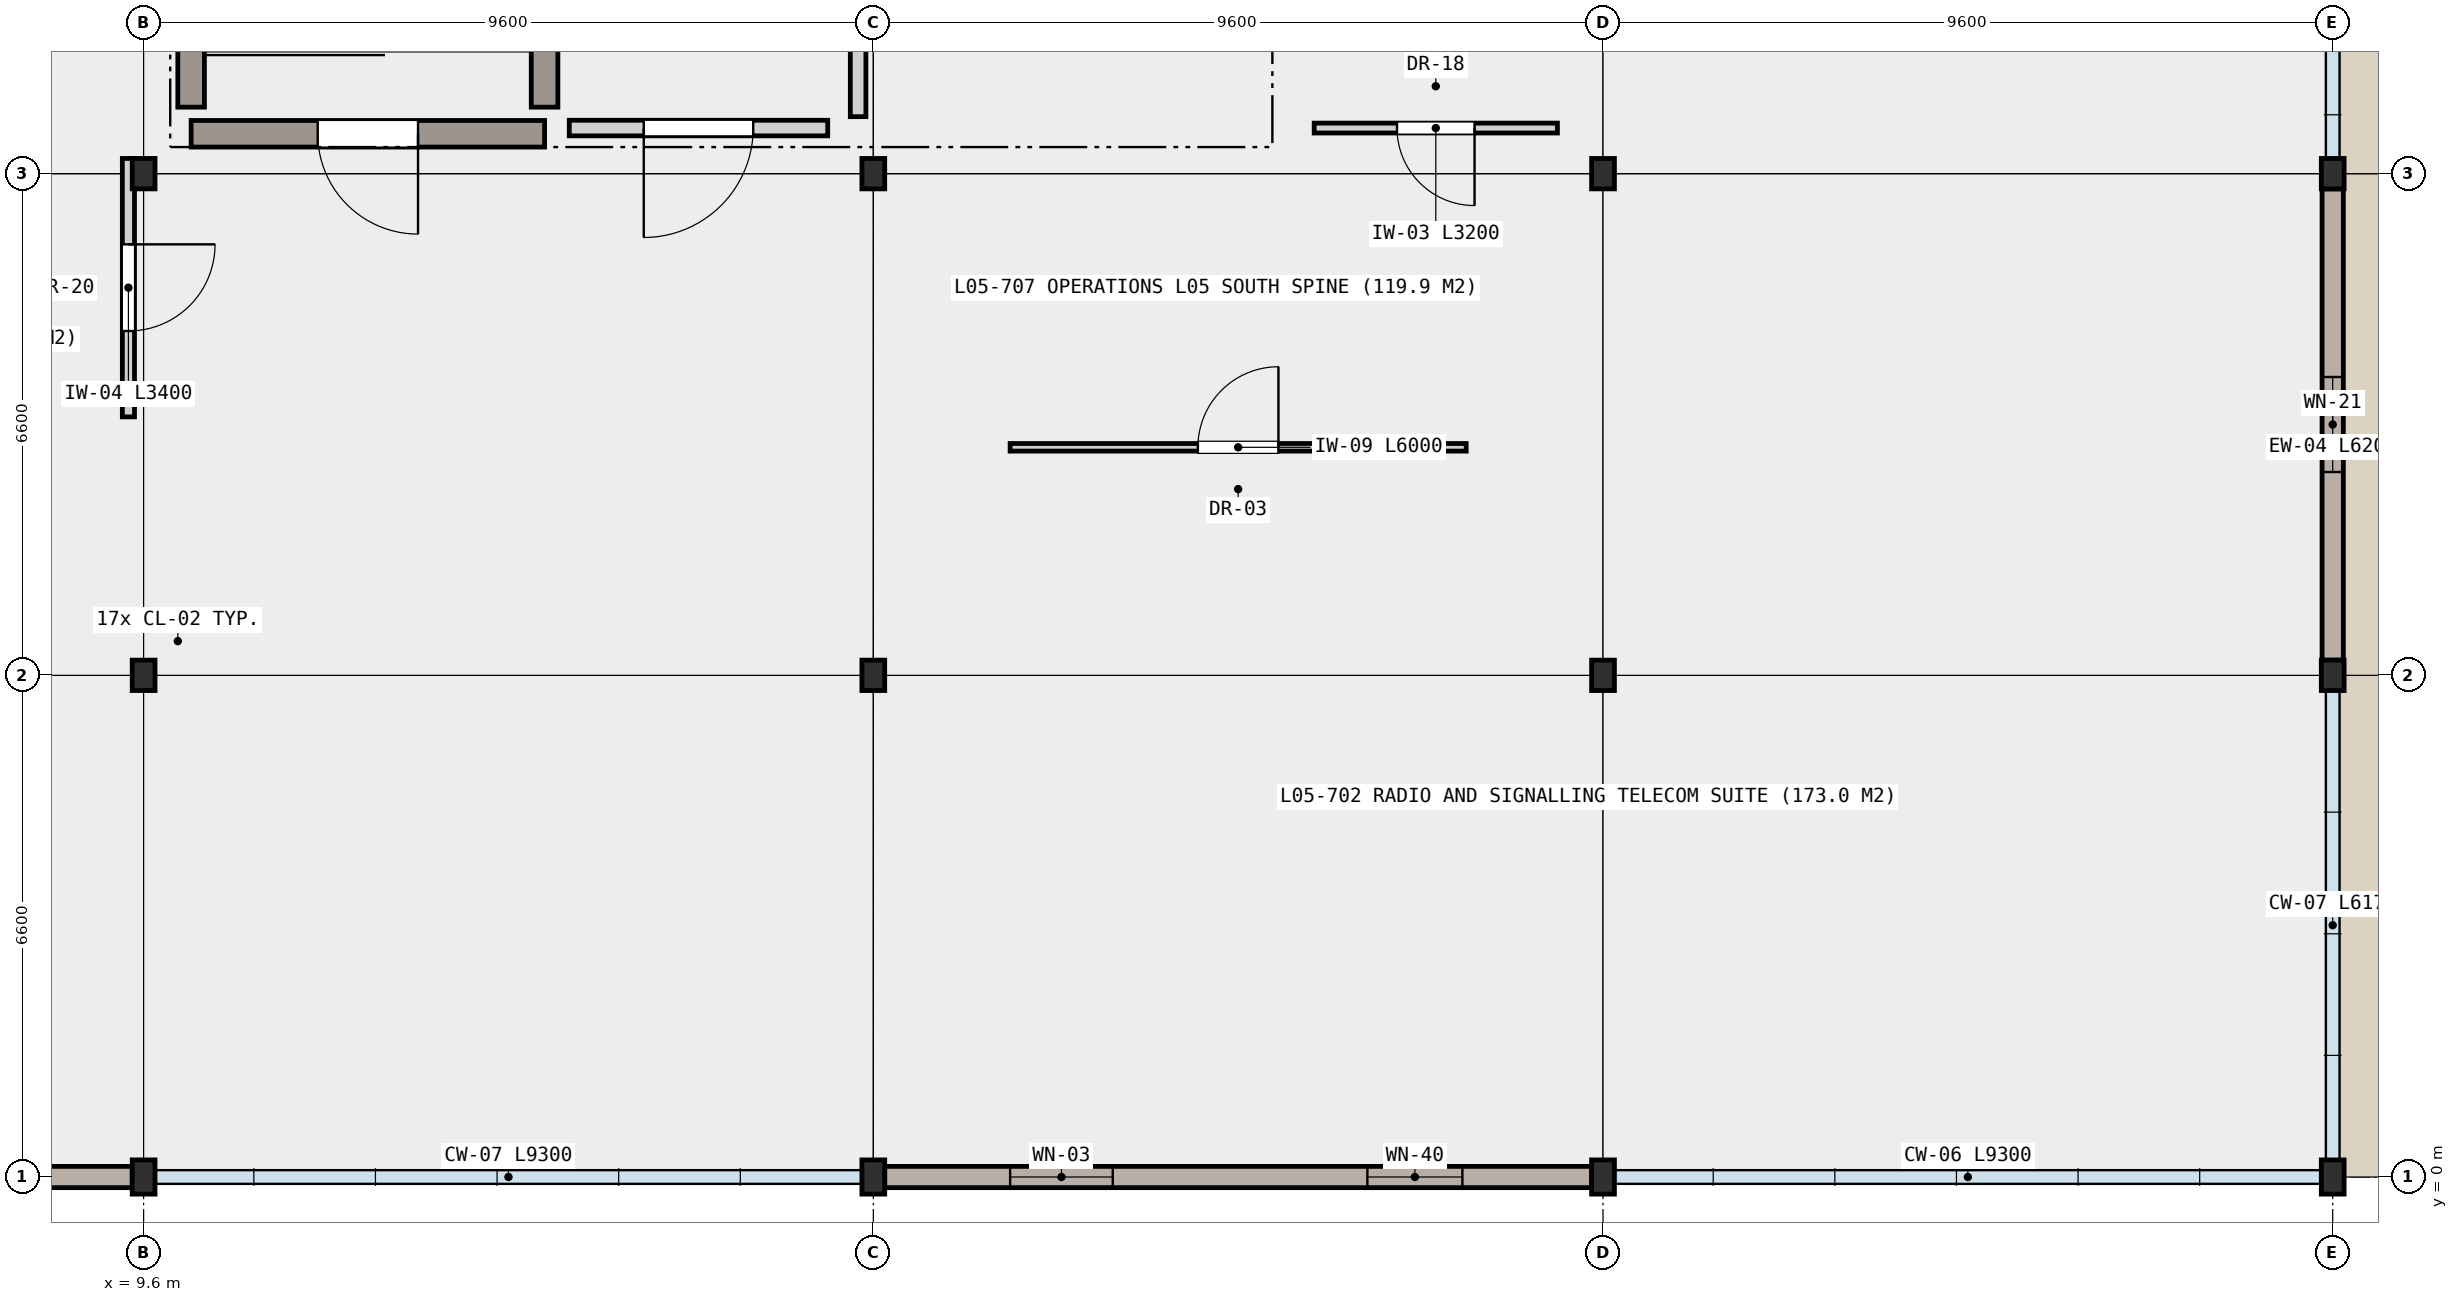
"""IFC4 building model, lengths in metres.
Left out: names, types, materials, properties, quantities, classifications, styles, units other than length and angle.
Written with IfcOpenShell. Run it as: python <this file> out.ifc"""

import sys

from ifc_helpers import new_model, si_unit, direction, frame, frame_2d, origin, origin_2d, place, context, subcontext, project, spatial, rectangle, i_section, extrude, element, fill, save


model = new_model("IFC4")
c1 = context("Model", 3, precision=1e-05, world=origin(), true_north=direction((0.0, 1.0)))
c2 = subcontext(c1, "Body", "Model", "MODEL_VIEW")
j1 = project(units=[si_unit("LENGTHUNIT", "METRE"), si_unit("PLANEANGLEUNIT", "RADIAN")], contexts=[c1])
p1 = place(None, origin())
s1 = spatial("IfcSite", under=j1, at=p1, CompositionType="ELEMENT")
p2 = place(p1, origin())
s2 = spatial("IfcBuilding", under=s1, at=p2, CompositionType="ELEMENT")
p3 = place(p2, frame((0.0, 0.0, 22.8)))
s3 = spatial("IfcBuildingStorey", under=s2, at=p3, CompositionType="ELEMENT", Elevation=22.8)
p4 = place(p3, frame((9.6, 0.0, 0.0), z_axis=(0.0, 0.0, 1.0), x_axis=(1.0, 0.0, 0.0)))
e1 = element("IfcColumn", 1, at=p4, inside=s3, PredefinedType="COLUMN", context=c2, shape_type="SweptSolid", body=[
    extrude(i_section(OverallWidth=0.3, OverallDepth=0.45, WebThickness=0.014, FlangeThickness=0.026, FilletRadius=0.027, at=origin_2d()), origin(), (0.0, 0.0, 1.0), 4.2),
])
for number, where, z_axis, x_axis in (
    (2, (9.6, 6.6, 0.0), (0.0, 0.0, 1.0), (1.0, 0.0, 0.0)),
    (3, (9.6, 13.2, 0.0), (0.0, 0.0, 1.0), (1.0, 0.0, 0.0)),
):
    element("IfcColumn", number, at=place(p3, frame(where, z_axis=z_axis, x_axis=x_axis)), inside=s3, PredefinedType="COLUMN", context=c2, shape_type="SweptSolid", body=[
        extrude(i_section(OverallWidth=0.3, OverallDepth=0.4, WebThickness=0.013, FlangeThickness=0.024, FilletRadius=0.027, at=origin_2d()), origin(), (0.0, 0.0, 1.0), 4.2),
    ])
p5 = place(p3, frame((19.2, 0.0, 0.0), z_axis=(0.0, 0.0, 1.0), x_axis=(1.0, 0.0, 0.0)))
e4 = element("IfcColumn", 4, at=p5, inside=s3, PredefinedType="COLUMN", context=c2, shape_type="SweptSolid", body=[
    extrude(i_section(OverallWidth=0.3, OverallDepth=0.45, WebThickness=0.014, FlangeThickness=0.026, FilletRadius=0.027, at=origin_2d()), origin(), (0.0, 0.0, 1.0), 4.2),
])
for number, where, z_axis, x_axis in (
    (5, (19.2, 6.6, 0.0), (0.0, 0.0, 1.0), (1.0, 0.0, 0.0)),
    (6, (19.2, 13.2, 0.0), (0.0, 0.0, 1.0), (1.0, 0.0, 0.0)),
):
    element("IfcColumn", number, at=place(p3, frame(where, z_axis=z_axis, x_axis=x_axis)), inside=s3, PredefinedType="COLUMN", context=c2, shape_type="SweptSolid", body=[
        extrude(i_section(OverallWidth=0.3, OverallDepth=0.4, WebThickness=0.013, FlangeThickness=0.024, FilletRadius=0.027, at=origin_2d()), origin(), (0.0, 0.0, 1.0), 4.2),
    ])
p6 = place(p3, frame((28.8, 0.0, 0.0), z_axis=(0.0, 0.0, 1.0), x_axis=(1.0, 0.0, 0.0)))
e7 = element("IfcColumn", 7, at=p6, inside=s3, PredefinedType="COLUMN", context=c2, shape_type="SweptSolid", body=[
    extrude(i_section(OverallWidth=0.3, OverallDepth=0.45, WebThickness=0.014, FlangeThickness=0.026, FilletRadius=0.027, at=origin_2d()), origin(), (0.0, 0.0, 1.0), 4.2),
])
for number, where, z_axis, x_axis in (
    (8, (28.8, 6.6, 0.0), (0.0, 0.0, 1.0), (1.0, 0.0, 0.0)),
    (9, (28.8, 13.2, 0.0), (0.0, 0.0, 1.0), (1.0, 0.0, 0.0)),
):
    element("IfcColumn", number, at=place(p3, frame(where, z_axis=z_axis, x_axis=x_axis)), inside=s3, PredefinedType="COLUMN", context=c2, shape_type="SweptSolid", body=[
        extrude(i_section(OverallWidth=0.3, OverallDepth=0.4, WebThickness=0.013, FlangeThickness=0.024, FilletRadius=0.027, at=origin_2d()), origin(), (0.0, 0.0, 1.0), 4.2),
    ])
p7 = place(p3, frame((38.4, 0.0, 0.0), z_axis=(0.0, 0.0, 1.0), x_axis=(1.0, 0.0, 0.0)))
e10 = element("IfcColumn", 10, at=p7, inside=s3, PredefinedType="COLUMN", context=c2, shape_type="SweptSolid", body=[
    extrude(i_section(OverallWidth=0.3, OverallDepth=0.45, WebThickness=0.014, FlangeThickness=0.026, FilletRadius=0.027, at=origin_2d()), origin(), (0.0, 0.0, 1.0), 4.2),
])
for number, where, z_axis, x_axis in (
    (11, (38.4, 6.6, 0.0), (0.0, 0.0, 1.0), (1.0, 0.0, 0.0)),
    (12, (38.4, 13.2, 0.0), (0.0, 0.0, 1.0), (1.0, 0.0, 0.0)),
):
    element("IfcColumn", number, at=place(p3, frame(where, z_axis=z_axis, x_axis=x_axis)), inside=s3, PredefinedType="COLUMN", context=c2, shape_type="SweptSolid", body=[
        extrude(i_section(OverallWidth=0.3, OverallDepth=0.4, WebThickness=0.013, FlangeThickness=0.024, FilletRadius=0.027, at=origin_2d()), origin(), (0.0, 0.0, 1.0), 4.2),
    ])
p8 = place(p3, frame((38.4, 13.0, 0.0), z_axis=(0.0, 0.0, 1.0), x_axis=(0.0, -1.0, 0.0)))
e13 = element("IfcWall", 13, at=p8, inside=s3, PredefinedType="SOLIDWALL", context=c2, shape_type="SweptSolid", body=[
    extrude(rectangle(XDim=6.2, YDim=0.28, at=frame_2d((3.1, 0.0))), origin(), (0.0, 0.0, 1.0), 3.57),
])
p9 = place(p8, frame((2.475, 0.0, 0.85)))
e14 = element("IfcOpeningElement", 14, at=p9, cuts=e13, PredefinedType="OPENING", context=c2, shape_type="SweptSolid", body=[
    extrude(rectangle(XDim=1.25, YDim=1.85, at=frame_2d((0.625, 0.925))), frame((0.0, 0.15, 0.0), z_axis=(0.0, -1.0, 0.0), x_axis=(1.0, 0.0, 0.0)), (0.0, 0.0, 1.0), 0.3),
])
p10 = place(p3, frame((28.65, 0.0, 0.0), z_axis=(0.0, 0.0, 1.0), x_axis=(-1.0, 0.0, 0.0)))
e15 = element("IfcWall", 15, at=p10, inside=s3, PredefinedType="SOLIDWALL", context=c2, shape_type="SweptSolid", body=[
    extrude(rectangle(XDim=9.3, YDim=0.28, at=frame_2d((4.65, 0.0))), origin(), (0.0, 0.0, 1.0), 3.61),
])
p11 = place(p10, frame((1.7, 0.0, 0.85)))
e16 = element("IfcOpeningElement", 16, at=p11, cuts=e15, PredefinedType="OPENING", context=c2, shape_type="SweptSolid", body=[
    extrude(rectangle(XDim=1.25, YDim=2.15, at=frame_2d((0.625, 1.075))), frame((0.0, 0.15, 0.0), z_axis=(0.0, -1.0, 0.0), x_axis=(1.0, 0.0, 0.0)), (0.0, 0.0, 1.0), 0.3),
])
p12 = place(p10, frame((6.3, 0.0, 0.85)))
e17 = element("IfcOpeningElement", 17, at=p12, cuts=e15, PredefinedType="OPENING", context=c2, shape_type="SweptSolid", body=[
    extrude(rectangle(XDim=1.35, YDim=1.5, at=frame_2d((0.675, 0.75))), frame((0.0, 0.15, 0.0), z_axis=(0.0, -1.0, 0.0), x_axis=(1.0, 0.0, 0.0)), (0.0, 0.0, 1.0), 0.3),
])
p13 = place(p3, frame((9.45, 0.0, 0.0), z_axis=(0.0, 0.0, 1.0), x_axis=(-1.0, 0.0, 0.0)))
e18 = element("IfcWall", 18, at=p13, inside=s3, PredefinedType="SOLIDWALL", context=c2, shape_type="SweptSolid", body=[
    extrude(rectangle(XDim=9.3, YDim=0.28, at=frame_2d((4.65, 0.0))), origin(), (0.0, 0.0, 1.0), 3.61),
])
p14 = place(p13, frame((1.65, 0.0, 0.85)))
e19 = element("IfcOpeningElement", 19, at=p14, cuts=e18, PredefinedType="OPENING", context=c2, shape_type="SweptSolid", body=[
    extrude(rectangle(XDim=1.35, YDim=1.85, at=frame_2d((0.675, 0.925))), frame((0.0, 0.15, 0.0), z_axis=(0.0, -1.0, 0.0), x_axis=(1.0, 0.0, 0.0)), (0.0, 0.0, 1.0), 0.3),
])
p15 = place(p13, frame((6.3, 0.0, 0.85)))
e20 = element("IfcOpeningElement", 20, at=p15, cuts=e18, PredefinedType="OPENING", context=c2, shape_type="SweptSolid", body=[
    extrude(rectangle(XDim=1.35, YDim=2.15, at=frame_2d((0.675, 1.075))), frame((0.0, 0.15, 0.0), z_axis=(0.0, -1.0, 0.0), x_axis=(1.0, 0.0, 0.0)), (0.0, 0.0, 1.0), 0.3),
])
p16 = place(p3, frame((14.875, 13.725, 0.0), z_axis=(0.0, 0.0, 1.0), x_axis=(-1.0, 0.0, 0.0)))
e21 = element("IfcWall", 21, at=p16, inside=s3, PredefinedType="SHEAR", context=c2, shape_type="SweptSolid", body=[
    extrude(rectangle(XDim=4.65, YDim=0.35, at=frame_2d((2.325, 0.0))), origin(), (0.0, 0.0, 1.0), 3.99),
])
p17 = place(p16, frame((1.665, 0.0, 0.0)))
e22 = element("IfcOpeningElement", 22, at=p17, cuts=e21, PredefinedType="OPENING", context=c2, shape_type="SweptSolid", body=[
    extrude(rectangle(XDim=1.32, YDim=2.15, at=frame_2d((0.66, 1.075))), frame((0.0, 0.185, 0.0), z_axis=(0.0, -1.0, 0.0), x_axis=(1.0, 0.0, 0.0)), (0.0, 0.0, 1.0), 0.37),
])
for number, where, z_axis, x_axis in (
    (23, (10.225, 14.075, 0.0), (0.0, 0.0, 1.0), (0.0, 1.0, 0.0)),
    (24, (14.875, 21.125, 0.0), (0.0, 0.0, 1.0), (0.0, -1.0, 0.0)),
):
    element("IfcWall", number, at=place(p3, frame(where, z_axis=z_axis, x_axis=x_axis)), inside=s3, PredefinedType="SHEAR", context=c2, shape_type="SweptSolid", body=[
        extrude(rectangle(XDim=7.05, YDim=0.35, at=frame_2d((3.525, 0.0))), origin(), (0.0, 0.0, 1.0), 3.99),
    ])
p18 = place(p3, frame((18.6, 13.8, 0.0), z_axis=(0.0, 0.0, 1.0), x_axis=(-1.0, 0.0, 0.0)))
e25 = element("IfcWall", 25, at=p18, inside=s3, PredefinedType="PARTITIONING", context=c2, shape_type="SweptSolid", body=[
    extrude(rectangle(XDim=3.4, YDim=0.205, at=frame_2d((1.7, 0.0))), origin(), (0.0, 0.0, 1.0), 3.99),
])
p19 = place(p18, frame((0.98, 0.0, 0.0)))
e26 = element("IfcOpeningElement", 26, at=p19, cuts=e25, PredefinedType="OPENING", context=c2, shape_type="SweptSolid", body=[
    extrude(rectangle(XDim=1.44, YDim=2.18, at=frame_2d((0.72, 1.09))), frame((0.0, 0.113, 0.0), z_axis=(0.0, -1.0, 0.0), x_axis=(1.0, 0.0, 0.0)), (0.0, 0.0, 1.0), 0.225),
])
p20 = place(p3, frame((19.0, 18.45, 0.0), z_axis=(0.0, 0.0, 1.0), x_axis=(0.0, -1.0, 0.0)))
e27 = element("IfcWall", 27, at=p20, inside=s3, PredefinedType="PARTITIONING", context=c2, shape_type="SweptSolid", body=[
    extrude(rectangle(XDim=4.5, YDim=0.205, at=frame_2d((2.25, 0.0))), origin(), (0.0, 0.0, 1.0), 3.57),
])
p21 = place(p3, frame((28.2, 13.8, 0.0), z_axis=(0.0, 0.0, 1.0), x_axis=(-1.0, 0.0, 0.0)))
e28 = element("IfcWall", 28, at=p21, inside=s3, PredefinedType="PARTITIONING", context=c2, shape_type="SweptSolid", body=[
    extrude(rectangle(XDim=3.2, YDim=0.13, at=frame_2d((1.6, 0.0))), origin(), (0.0, 0.0, 1.0), 3.99),
])
p22 = place(p21, frame((1.09, 0.0, 0.0)))
e29 = element("IfcOpeningElement", 29, at=p22, cuts=e28, PredefinedType="OPENING", context=c2, shape_type="SweptSolid", body=[
    extrude(rectangle(XDim=1.02, YDim=2.14, at=frame_2d((0.51, 1.07))), frame((0.0, 0.075, 0.0), z_axis=(0.0, -1.0, 0.0), x_axis=(1.0, 0.0, 0.0)), (0.0, 0.0, 1.0), 0.15),
])
p23 = place(p3, frame((21.0, 9.6, 0.0), z_axis=(0.0, 0.0, 1.0), x_axis=(1.0, 0.0, 0.0)))
e30 = element("IfcWall", 30, at=p23, inside=s3, PredefinedType="PARTITIONING", context=c2, shape_type="SweptSolid", body=[
    extrude(rectangle(XDim=6.0, YDim=0.1, at=frame_2d((3.0, 0.0))), origin(), (0.0, 0.0, 1.0), 3.99),
])
p24 = place(p23, frame((2.47, 0.0, 0.0)))
e31 = element("IfcOpeningElement", 31, at=p24, cuts=e30, PredefinedType="OPENING", context=c2, shape_type="SweptSolid", body=[
    extrude(rectangle(XDim=1.06, YDim=2.14, at=frame_2d((0.53, 1.07))), frame((0.0, 0.06, 0.0), z_axis=(0.0, -1.0, 0.0), x_axis=(1.0, 0.0, 0.0)), (0.0, 0.0, 1.0), 0.12),
])
p25 = place(p3, frame((9.4, 13.4, 0.0), z_axis=(0.0, 0.0, 1.0), x_axis=(0.0, -1.0, 0.0)))
e32 = element("IfcWall", 32, at=p25, inside=s3, PredefinedType="PARTITIONING", context=c2, shape_type="SweptSolid", body=[
    extrude(rectangle(XDim=3.4, YDim=0.16, at=frame_2d((1.7, 0.0))), origin(), (0.0, 0.0, 1.0), 3.57),
])
p26 = place(p25, frame((1.13, 0.0, 0.0)))
e33 = element("IfcOpeningElement", 33, at=p26, cuts=e32, PredefinedType="OPENING", context=c2, shape_type="SweptSolid", body=[
    extrude(rectangle(XDim=1.14, YDim=2.16, at=frame_2d((0.57, 1.08))), frame((0.0, 0.09, 0.0), z_axis=(0.0, -1.0, 0.0), x_axis=(1.0, 0.0, 0.0)), (0.0, 0.0, 1.0), 0.18),
])
p27 = place(p9, origin())
e34 = element("IfcWindow", 34, at=p27, inside=s3, PartitioningType="SINGLE_PANEL", PredefinedType="WINDOW", context=c2, shape_type="SweptSolid", body=[
    extrude(rectangle(XDim=1.25, YDim=1.85, at=frame_2d((0.625, 0.925))), frame((0.0, 0.03, 0.0), z_axis=(0.0, -1.0, 0.0), x_axis=(1.0, 0.0, 0.0)), (0.0, 0.0, 1.0), 0.06),
])
fill(e14, e34)
p28 = place(p11, origin())
e35 = element("IfcWindow", 35, at=p28, inside=s3, PartitioningType="SINGLE_PANEL", PredefinedType="WINDOW", context=c2, shape_type="SweptSolid", body=[
    extrude(rectangle(XDim=1.25, YDim=2.15, at=frame_2d((0.625, 1.075))), frame((0.0, 0.03, 0.0), z_axis=(0.0, -1.0, 0.0), x_axis=(1.0, 0.0, 0.0)), (0.0, 0.0, 1.0), 0.06),
])
fill(e16, e35)
p29 = place(p12, origin())
e36 = element("IfcWindow", 36, at=p29, inside=s3, PartitioningType="SINGLE_PANEL", PredefinedType="WINDOW", context=c2, shape_type="SweptSolid", body=[
    extrude(rectangle(XDim=1.35, YDim=1.5, at=frame_2d((0.675, 0.75))), frame((0.0, 0.03, 0.0), z_axis=(0.0, -1.0, 0.0), x_axis=(1.0, 0.0, 0.0)), (0.0, 0.0, 1.0), 0.06),
])
fill(e17, e36)
p30 = place(p17, origin())
e37 = element("IfcDoor", 37, at=p30, inside=s3, OperationType="SINGLE_SWING_LEFT", PredefinedType="DOOR", context=c2, shape_type="SweptSolid", body=[
    extrude(rectangle(XDim=1.32, YDim=2.15, at=frame_2d((0.66, 1.075))), frame((0.0, 0.025, 0.0), z_axis=(0.0, -1.0, 0.0), x_axis=(1.0, 0.0, 0.0)), (0.0, 0.0, 1.0), 0.05),
])
fill(e22, e37)
p31 = place(p19, origin())
e38 = element("IfcDoor", 38, at=p31, inside=s3, OperationType="SINGLE_SWING_RIGHT", PredefinedType="DOOR", context=c2, shape_type="SweptSolid", body=[
    extrude(rectangle(XDim=1.44, YDim=2.18, at=frame_2d((0.72, 1.09))), frame((0.0, 0.025, 0.0), z_axis=(0.0, -1.0, 0.0), x_axis=(1.0, 0.0, 0.0)), (0.0, 0.0, 1.0), 0.05),
])
fill(e26, e38)
p32 = place(p22, origin())
e39 = element("IfcDoor", 39, at=p32, inside=s3, OperationType="SINGLE_SWING_LEFT", PredefinedType="DOOR", context=c2, shape_type="SweptSolid", body=[
    extrude(rectangle(XDim=1.02, YDim=2.14, at=frame_2d((0.51, 1.07))), frame((0.0, 0.025, 0.0), z_axis=(0.0, -1.0, 0.0), x_axis=(1.0, 0.0, 0.0)), (0.0, 0.0, 1.0), 0.05),
])
fill(e29, e39)
p33 = place(p24, origin())
e40 = element("IfcDoor", 40, at=p33, inside=s3, OperationType="SINGLE_SWING_RIGHT", PredefinedType="DOOR", context=c2, shape_type="SweptSolid", body=[
    extrude(rectangle(XDim=1.06, YDim=2.14, at=frame_2d((0.53, 1.07))), frame((0.0, 0.025, 0.0), z_axis=(0.0, -1.0, 0.0), x_axis=(1.0, 0.0, 0.0)), (0.0, 0.0, 1.0), 0.05),
])
fill(e31, e40)
p34 = place(p26, origin())
e41 = element("IfcDoor", 41, at=p34, inside=s3, OperationType="SINGLE_SWING_LEFT", PredefinedType="DOOR", context=c2, shape_type="SweptSolid", body=[
    extrude(rectangle(XDim=1.14, YDim=2.16, at=frame_2d((0.57, 1.08))), frame((0.0, 0.025, 0.0), z_axis=(0.0, -1.0, 0.0), x_axis=(1.0, 0.0, 0.0)), (0.0, 0.0, 1.0), 0.05),
])
fill(e33, e41)
save(model, sys.argv[1])
